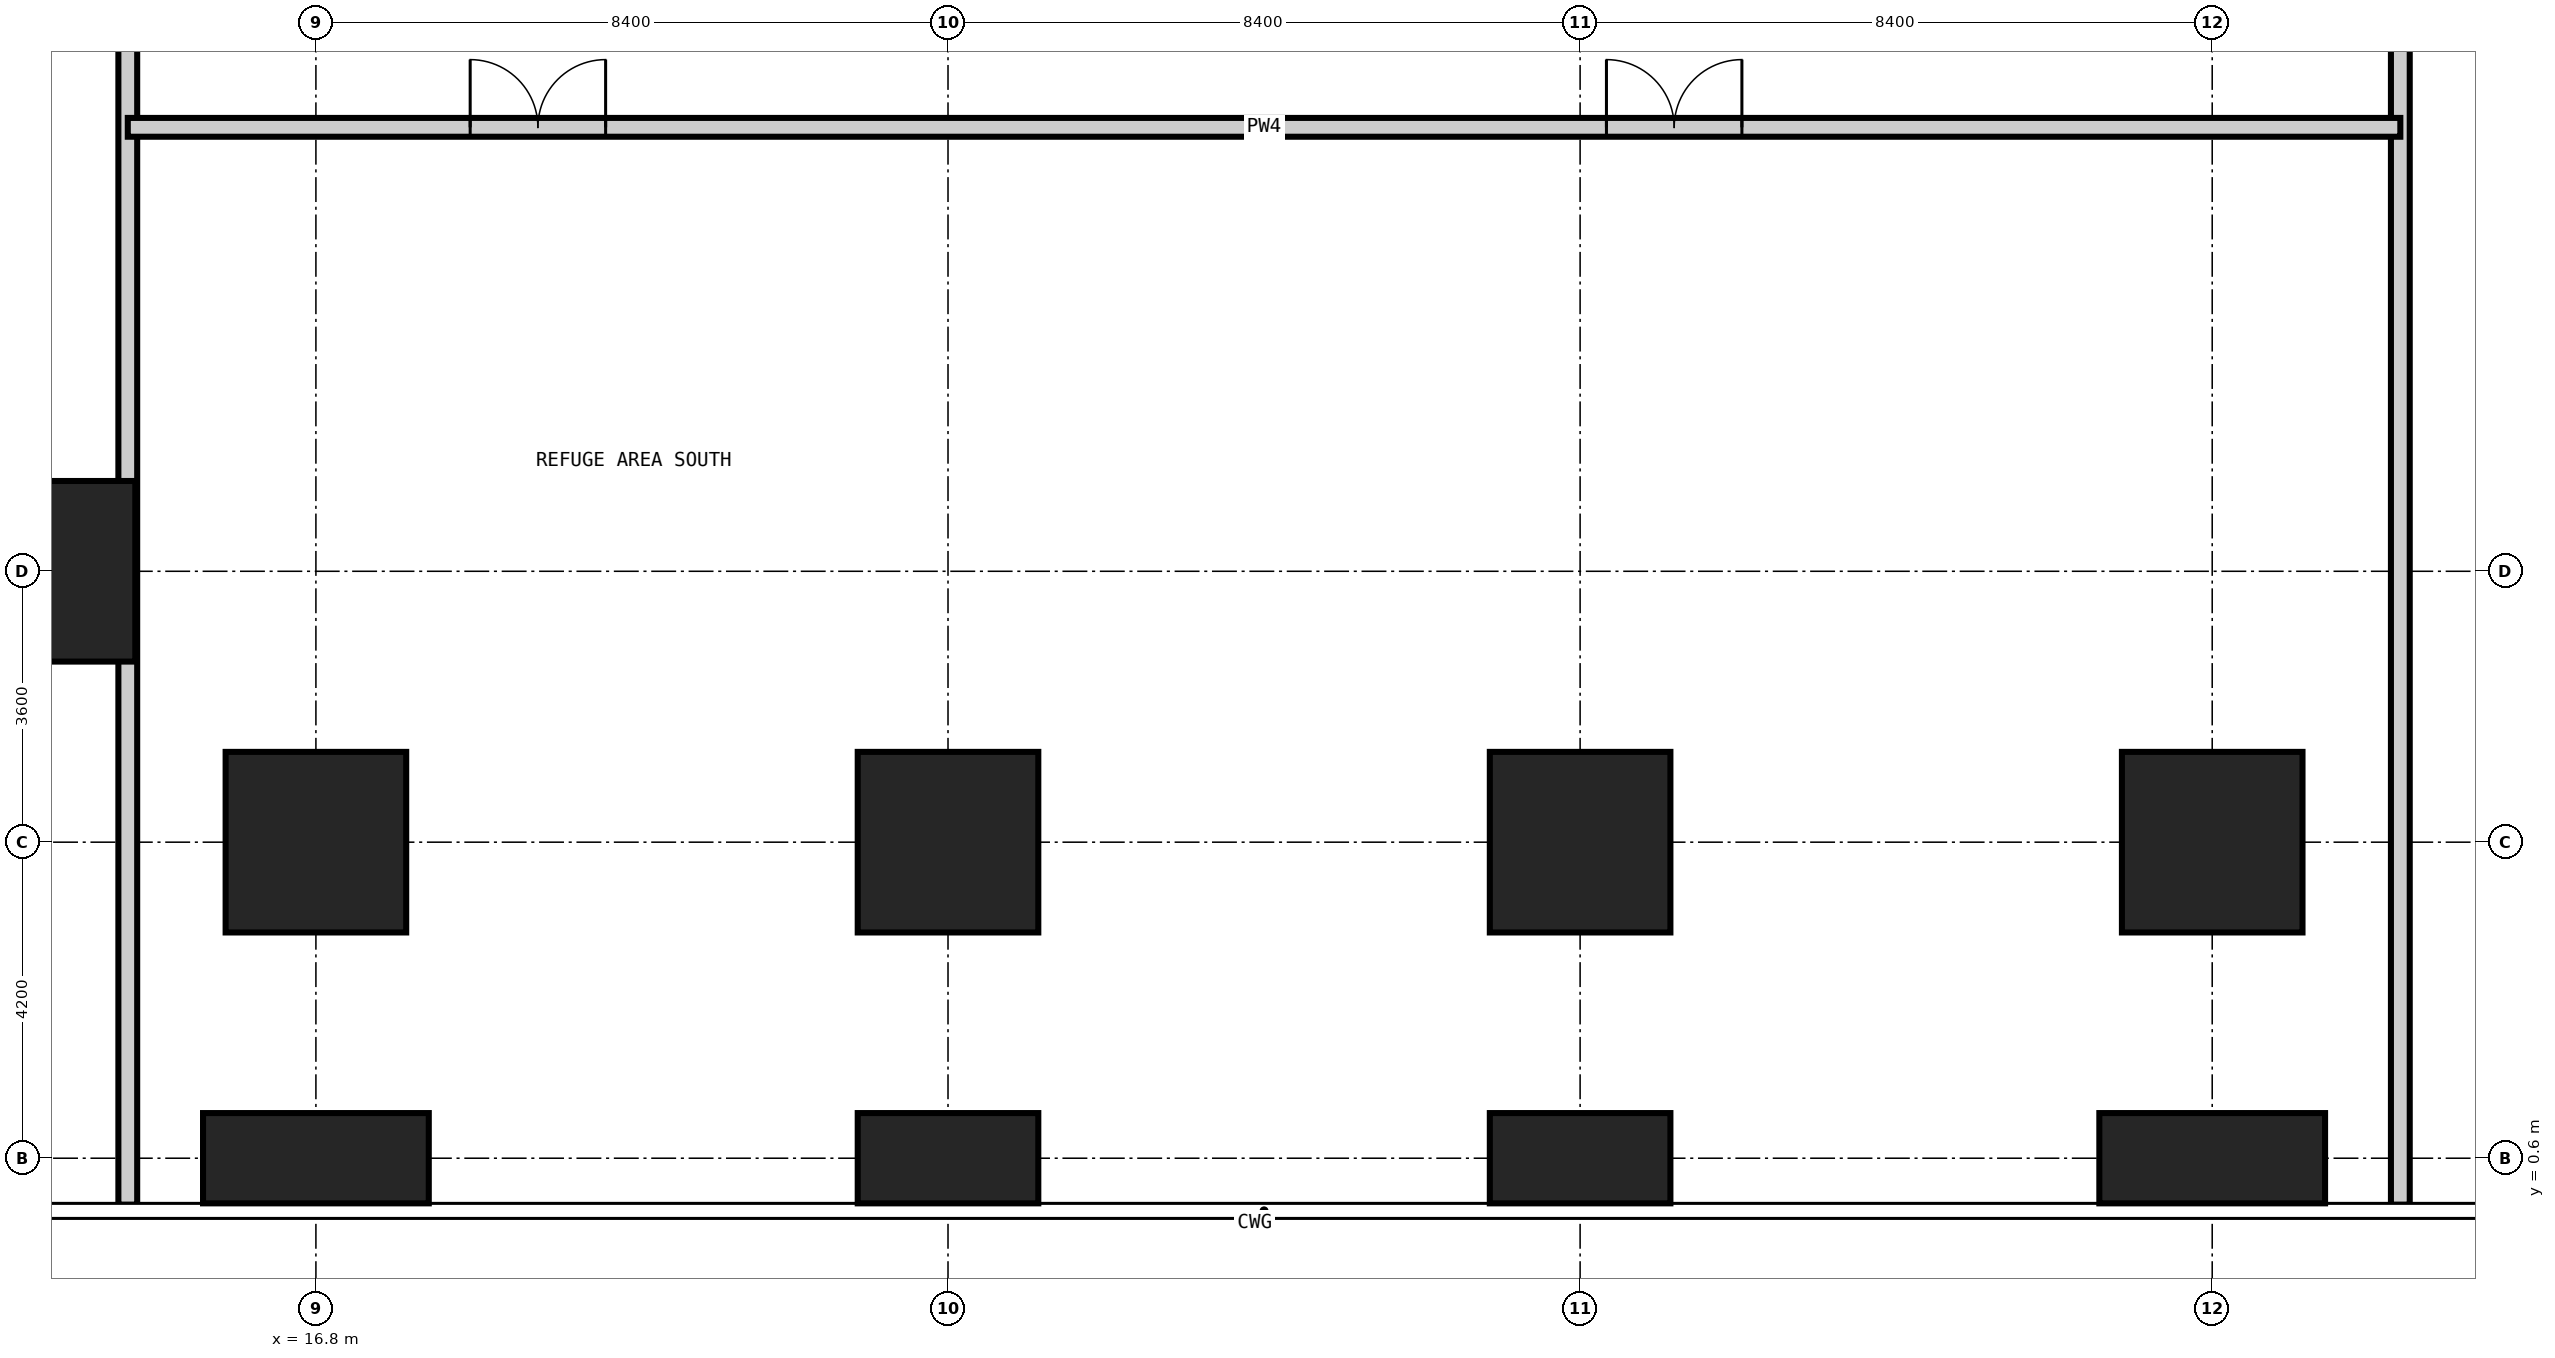
"""IFC4 building model, lengths in metres.
Left out: names, types, materials, properties, quantities, classifications, styles, units other than length and angle.
Written with IfcOpenShell. Run it as: python <this file> out.ifc"""

import sys

from ifc_helpers import new_model, si_unit, direction, frame, frame_2d, origin, origin_2d, place, context, subcontext, project, spatial, rectangle, extrude, element, fill, save


model = new_model("IFC4")
c1 = context("Model", 3, precision=1e-05, world=origin(), true_north=direction((0.0, 1.0)))
c2 = subcontext(c1, "Body", "Model", "MODEL_VIEW")
j1 = project(units=[si_unit("LENGTHUNIT", "METRE"), si_unit("PLANEANGLEUNIT", "RADIAN")], contexts=[c1])
p1 = place(None, origin())
s1 = spatial("IfcSite", under=j1, at=p1, CompositionType="ELEMENT")
p2 = place(p1, origin())
s2 = spatial("IfcBuilding", under=s1, at=p2, CompositionType="ELEMENT")
p3 = place(p2, frame((0.0, 0.0, 88.2)))
s3 = spatial("IfcBuildingStorey", under=s2, at=p3, CompositionType="ELEMENT", Elevation=88.2)
p4 = place(p3, frame((13.2, 8.4, -0.4), z_axis=(0.0, 0.0, 1.0), x_axis=(1.0, 0.0, 0.0)))
e1 = element("IfcColumn", 1, at=p4, inside=s3, PredefinedType="COLUMN", context=c2, shape_type="SweptSolid", body=[
    extrude(rectangle(XDim=2.4, YDim=2.4, at=origin_2d()), origin(), (0.0, 0.0, 1.0), 5.45),
])
p5 = place(p3, frame((16.8, 0.6, -0.4), z_axis=(0.0, 0.0, 1.0), x_axis=(1.0, 0.0, 0.0)))
e2 = element("IfcColumn", 2, at=p5, inside=s3, PredefinedType="COLUMN", context=c2, shape_type="SweptSolid", body=[
    extrude(rectangle(XDim=3.0, YDim=1.2, at=origin_2d()), origin(), (0.0, 0.0, 1.0), 5.45),
])
p6 = place(p3, frame((16.8, 4.8, -0.4), z_axis=(0.0, 0.0, 1.0), x_axis=(1.0, 0.0, 0.0)))
e3 = element("IfcColumn", 3, at=p6, inside=s3, PredefinedType="COLUMN", context=c2, shape_type="SweptSolid", body=[
    extrude(rectangle(XDim=2.4, YDim=2.4, at=origin_2d()), origin(), (0.0, 0.0, 1.0), 5.45),
])
p7 = place(p3, frame((25.2, 0.6, -0.4), z_axis=(0.0, 0.0, 1.0), x_axis=(1.0, 0.0, 0.0)))
e4 = element("IfcColumn", 4, at=p7, inside=s3, PredefinedType="COLUMN", context=c2, shape_type="SweptSolid", body=[
    extrude(rectangle(XDim=2.4, YDim=1.2, at=origin_2d()), origin(), (0.0, 0.0, 1.0), 5.45),
])
p8 = place(p3, frame((25.2, 4.8, -0.4), z_axis=(0.0, 0.0, 1.0), x_axis=(1.0, 0.0, 0.0)))
e5 = element("IfcColumn", 5, at=p8, inside=s3, PredefinedType="COLUMN", context=c2, shape_type="SweptSolid", body=[
    extrude(rectangle(XDim=2.4, YDim=2.4, at=origin_2d()), origin(), (0.0, 0.0, 1.0), 5.45),
])
p9 = place(p3, frame((33.6, 0.6, -0.4), z_axis=(0.0, 0.0, 1.0), x_axis=(1.0, 0.0, 0.0)))
e6 = element("IfcColumn", 6, at=p9, inside=s3, PredefinedType="COLUMN", context=c2, shape_type="SweptSolid", body=[
    extrude(rectangle(XDim=2.4, YDim=1.2, at=origin_2d()), origin(), (0.0, 0.0, 1.0), 5.45),
])
p10 = place(p3, frame((33.6, 4.8, -0.4), z_axis=(0.0, 0.0, 1.0), x_axis=(1.0, 0.0, 0.0)))
e7 = element("IfcColumn", 7, at=p10, inside=s3, PredefinedType="COLUMN", context=c2, shape_type="SweptSolid", body=[
    extrude(rectangle(XDim=2.4, YDim=2.4, at=origin_2d()), origin(), (0.0, 0.0, 1.0), 5.45),
])
p11 = place(p3, frame((42.0, 0.6, -0.4), z_axis=(0.0, 0.0, 1.0), x_axis=(1.0, 0.0, 0.0)))
e8 = element("IfcColumn", 8, at=p11, inside=s3, PredefinedType="COLUMN", context=c2, shape_type="SweptSolid", body=[
    extrude(rectangle(XDim=3.0, YDim=1.2, at=origin_2d()), origin(), (0.0, 0.0, 1.0), 5.45),
])
p12 = place(p3, frame((42.0, 4.8, -0.4), z_axis=(0.0, 0.0, 1.0), x_axis=(1.0, 0.0, 0.0)))
e9 = element("IfcColumn", 9, at=p12, inside=s3, PredefinedType="COLUMN", context=c2, shape_type="SweptSolid", body=[
    extrude(rectangle(XDim=2.4, YDim=2.4, at=origin_2d()), origin(), (0.0, 0.0, 1.0), 5.45),
])
p13 = place(p3, frame((14.3, -0.018, 0.0), z_axis=(0.0, 0.0, 1.0), x_axis=(0.0, 1.0, 0.0)))
e10 = element("IfcWall", 10, at=p13, inside=s3, PredefinedType="PARTITIONING", context=c2, shape_type="SweptSolid", body=[
    extrude(rectangle(XDim=58.836, YDim=0.25, at=frame_2d((29.418, 0.0))), origin(), (0.0, 0.0, 1.0), 5.05),
])
p14 = place(p13, frame((22.168, 0.0, 0.0)))
e11 = element("IfcOpeningElement", 11, at=p14, cuts=e10, PredefinedType="OPENING", context=c2, shape_type="SweptSolid", body=[
    extrude(rectangle(XDim=1.8, YDim=2.4, at=frame_2d((0.9, 1.2))), frame((0.0, 0.135, 0.0), z_axis=(0.0, -1.0, 0.0), x_axis=(1.0, 0.0, 0.0)), (0.0, 0.0, 1.0), 0.27),
])
p15 = place(p13, frame((38.168, 0.0, 0.0)))
e12 = element("IfcOpeningElement", 12, at=p15, cuts=e10, PredefinedType="OPENING", context=c2, shape_type="SweptSolid", body=[
    extrude(rectangle(XDim=1.8, YDim=2.4, at=frame_2d((0.9, 1.2))), frame((0.0, 0.135, 0.0), z_axis=(0.0, -1.0, 0.0), x_axis=(1.0, 0.0, 0.0)), (0.0, 0.0, 1.0), 0.27),
])
p16 = place(p3, frame((44.5, -0.018, 0.0), z_axis=(0.0, 0.0, 1.0), x_axis=(0.0, 1.0, 0.0)))
e13 = element("IfcWall", 13, at=p16, inside=s3, PredefinedType="PARTITIONING", context=c2, shape_type="SweptSolid", body=[
    extrude(rectangle(XDim=58.836, YDim=0.25, at=frame_2d((29.418, 0.0))), origin(), (0.0, 0.0, 1.0), 5.05),
])
p17 = place(p16, frame((23.068, 0.0, 0.0)))
e14 = element("IfcOpeningElement", 14, at=p17, cuts=e13, PredefinedType="OPENING", context=c2, shape_type="SweptSolid", body=[
    extrude(rectangle(XDim=1.8, YDim=2.4, at=frame_2d((0.9, 1.2))), frame((0.0, 0.135, 0.0), z_axis=(0.0, -1.0, 0.0), x_axis=(1.0, 0.0, 0.0)), (0.0, 0.0, 1.0), 0.27),
])
p18 = place(p16, frame((38.168, 0.0, 0.0)))
e15 = element("IfcOpeningElement", 15, at=p18, cuts=e13, PredefinedType="OPENING", context=c2, shape_type="SweptSolid", body=[
    extrude(rectangle(XDim=1.8, YDim=2.4, at=frame_2d((0.9, 1.2))), frame((0.0, 0.135, 0.0), z_axis=(0.0, -1.0, 0.0), x_axis=(1.0, 0.0, 0.0)), (0.0, 0.0, 1.0), 0.27),
])
p19 = place(p3, frame((14.3, 14.3, 0.0), z_axis=(0.0, 0.0, 1.0), x_axis=(1.0, 0.0, 0.0)))
e16 = element("IfcWall", 16, at=p19, inside=s3, PredefinedType="PARTITIONING", context=c2, shape_type="SweptSolid", body=[
    extrude(rectangle(XDim=30.2, YDim=0.25, at=frame_2d((15.1, 0.0))), origin(), (0.0, 0.0, 1.0), 5.05),
])
p20 = place(p19, frame((19.65, 0.0, 0.0)))
e17 = element("IfcOpeningElement", 17, at=p20, cuts=e16, PredefinedType="OPENING", context=c2, shape_type="SweptSolid", body=[
    extrude(rectangle(XDim=1.8, YDim=2.4, at=frame_2d((0.9, 1.2))), frame((0.0, 0.135, 0.0), z_axis=(0.0, -1.0, 0.0), x_axis=(1.0, 0.0, 0.0)), (0.0, 0.0, 1.0), 0.27),
])
p21 = place(p19, frame((4.55, 0.0, 0.0)))
e18 = element("IfcOpeningElement", 18, at=p21, cuts=e16, PredefinedType="OPENING", context=c2, shape_type="SweptSolid", body=[
    extrude(rectangle(XDim=1.8, YDim=2.4, at=frame_2d((0.9, 1.2))), frame((0.0, 0.135, 0.0), z_axis=(0.0, -1.0, 0.0), x_axis=(1.0, 0.0, 0.0)), (0.0, 0.0, 1.0), 0.27),
])
p22 = place(p20, origin())
e19 = element("IfcDoor", 19, at=p22, inside=s3, OperationType="DOUBLE_DOOR_DOUBLE_SWING", PredefinedType="DOOR", context=c2, shape_type="SweptSolid", body=[
    extrude(rectangle(XDim=1.8, YDim=2.4, at=frame_2d((0.9, 1.2))), frame((0.0, 0.025, 0.0), z_axis=(0.0, -1.0, 0.0), x_axis=(1.0, 0.0, 0.0)), (0.0, 0.0, 1.0), 0.05),
])
fill(e17, e19)
p23 = place(p21, origin())
e20 = element("IfcDoor", 20, at=p23, inside=s3, OperationType="DOUBLE_DOOR_DOUBLE_SWING", PredefinedType="DOOR", context=c2, shape_type="SweptSolid", body=[
    extrude(rectangle(XDim=1.8, YDim=2.4, at=frame_2d((0.9, 1.2))), frame((0.0, 0.025, 0.0), z_axis=(0.0, -1.0, 0.0), x_axis=(1.0, 0.0, 0.0)), (0.0, 0.0, 1.0), 0.05),
])
fill(e18, e20)
save(model, sys.argv[1])
